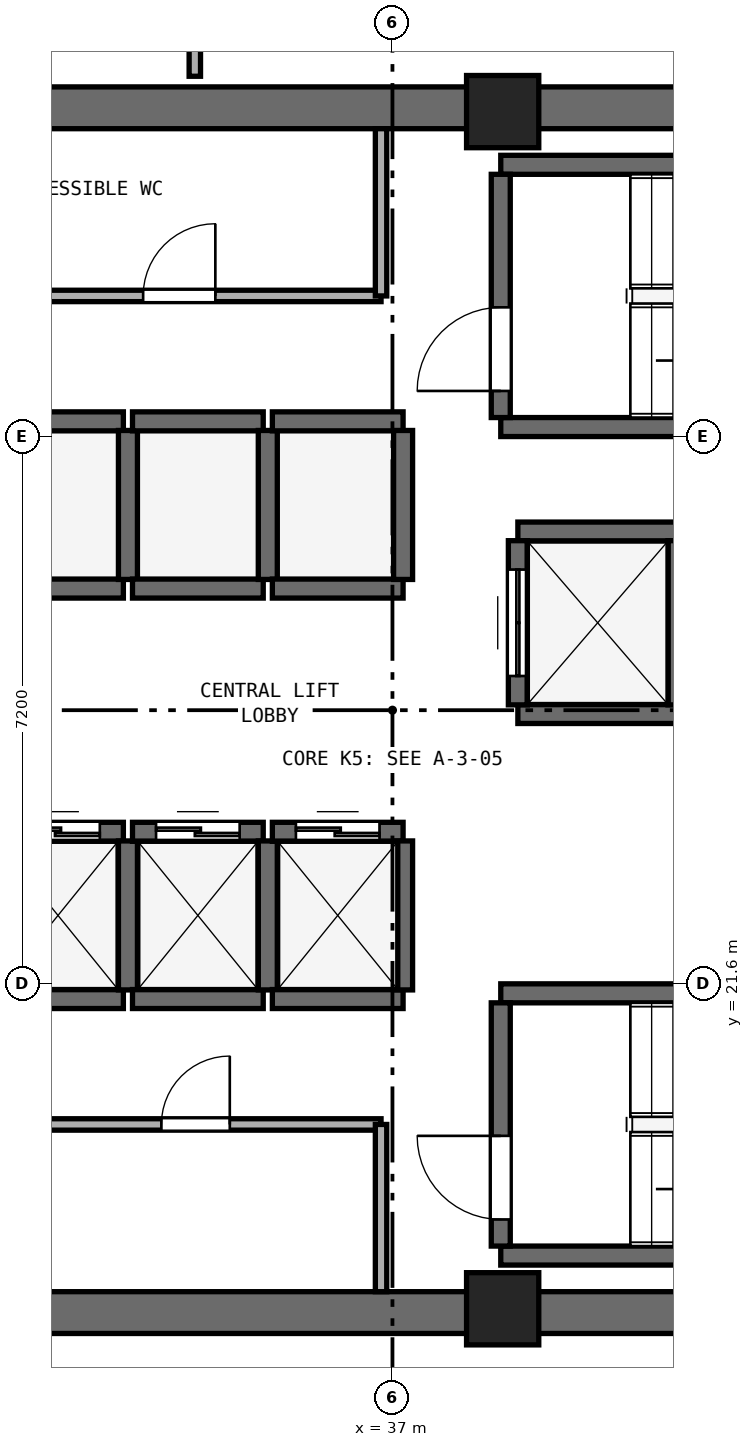
"""IFC4 building model, lengths in metres.
Left out: names, types, materials, properties, quantities, classifications, styles, units other than length and angle.
Written with IfcOpenShell. Run it as: python <this file> out.ifc"""

import sys

from ifc_helpers import new_model, si_unit, direction, frame, frame_2d, origin, origin_2d, place, context, subcontext, project, spatial, rectangle, extrude, element, fill, save


model = new_model("IFC4")
c1 = context("Model", 3, precision=1e-05, world=origin(), true_north=direction((0.0, 1.0)))
c2 = subcontext(c1, "Body", "Model", "MODEL_VIEW")
j1 = project(units=[si_unit("LENGTHUNIT", "METRE"), si_unit("PLANEANGLEUNIT", "RADIAN")], contexts=[c1])
p1 = place(None, origin())
s1 = spatial("IfcSite", under=j1, at=p1, CompositionType="ELEMENT")
p2 = place(p1, origin())
s2 = spatial("IfcBuilding", under=s1, at=p2, CompositionType="ELEMENT")
p3 = place(p2, frame((0.0, 0.0, 136.4)))
s3 = spatial("IfcBuildingStorey", under=s2, at=p3, CompositionType="ELEMENT", Elevation=136.4)
for number, where, z_axis, x_axis in (
    (1, (25.4, 17.275, 0.0), (0.0, 0.0, 1.0), (1.0, 0.0, 0.0)),
    (2, (25.4, 33.125, 0.0), (0.0, 0.0, 1.0), (1.0, 0.0, 0.0)),
):
    element("IfcWall", number, at=place(p3, frame(where, z_axis=z_axis, x_axis=x_axis)), inside=s3, PredefinedType="SHEAR", context=c2, shape_type="SweptSolid", body=[
        extrude(rectangle(XDim=23.2, YDim=0.55, at=frame_2d((11.6, 0.0))), origin(), (0.0, 0.0, 1.0), 3.54),
    ])
for number, where, z_axis, x_axis in (
    (3, (38.45, 17.325, 0.0), (0.0, 0.0, 1.0), (1.0, 0.0, 0.0)),
    (4, (38.45, 33.075, 0.0), (0.0, 0.0, 1.0), (1.0, 0.0, 0.0)),
):
    element("IfcColumn", number, at=place(p3, frame(where, z_axis=z_axis, x_axis=x_axis)), inside=s3, PredefinedType="PILASTER", context=c2, shape_type="SweptSolid", body=[
        extrude(rectangle(XDim=0.95, YDim=0.95, at=origin_2d()), origin(), (0.0, 0.0, 1.0), 3.8),
    ])
for number, where, z_axis, x_axis in (
    (5, (38.425, 28.925, 0.0), (0.0, 0.0, 1.0), (1.0, 0.0, 0.0)),
    (6, (38.425, 32.375, 0.0), (0.0, 0.0, 1.0), (1.0, 0.0, 0.0)),
):
    element("IfcWall", number, at=place(p3, frame(where, z_axis=z_axis, x_axis=x_axis)), inside=s3, PredefinedType="SHEAR", context=c2, shape_type="SweptSolid", body=[
        extrude(rectangle(XDim=7.3, YDim=0.25, at=frame_2d((3.65, 0.0))), origin(), (0.0, 0.0, 1.0), 3.54),
    ])
p4 = place(p3, frame((38.425, 29.05, 0.0), z_axis=(0.0, 0.0, 1.0), x_axis=(0.0, 1.0, 0.0)))
e7 = element("IfcWall", 7, at=p4, inside=s3, PredefinedType="SHEAR", context=c2, shape_type="SweptSolid", body=[
    extrude(rectangle(XDim=3.2, YDim=0.25, at=frame_2d((1.6, 0.0))), origin(), (0.0, 0.0, 1.0), 3.54),
])
p5 = place(p4, frame((0.35, 0.0, 0.0)))
e8 = element("IfcOpeningElement", 8, at=p5, cuts=e7, PredefinedType="OPENING", context=c2, shape_type="SweptSolid", body=[
    extrude(rectangle(XDim=1.1, YDim=2.15, at=frame_2d((0.55, 1.075))), frame((0.0, 0.135, 0.0), z_axis=(0.0, -1.0, 0.0), x_axis=(1.0, 0.0, 0.0)), (0.0, 0.0, 1.0), 0.27),
])
for number, where, z_axis, x_axis in (
    (9, (38.425, 18.025, 0.0), (0.0, 0.0, 1.0), (1.0, 0.0, 0.0)),
    (10, (38.425, 21.475, 0.0), (0.0, 0.0, 1.0), (1.0, 0.0, 0.0)),
):
    element("IfcWall", number, at=place(p3, frame(where, z_axis=z_axis, x_axis=x_axis)), inside=s3, PredefinedType="SHEAR", context=c2, shape_type="SweptSolid", body=[
        extrude(rectangle(XDim=7.3, YDim=0.25, at=frame_2d((3.65, 0.0))), origin(), (0.0, 0.0, 1.0), 3.54),
    ])
p6 = place(p3, frame((38.425, 18.15, 0.0), z_axis=(0.0, 0.0, 1.0), x_axis=(0.0, 1.0, 0.0)))
e11 = element("IfcWall", 11, at=p6, inside=s3, PredefinedType="SHEAR", context=c2, shape_type="SweptSolid", body=[
    extrude(rectangle(XDim=3.2, YDim=0.25, at=frame_2d((1.6, 0.0))), origin(), (0.0, 0.0, 1.0), 3.54),
])
p7 = place(p6, frame((0.35, 0.0, 0.0)))
e12 = element("IfcOpeningElement", 12, at=p7, cuts=e11, PredefinedType="OPENING", context=c2, shape_type="SweptSolid", body=[
    extrude(rectangle(XDim=1.1, YDim=2.15, at=frame_2d((0.55, 1.075))), frame((0.0, 0.135, 0.0), z_axis=(0.0, -1.0, 0.0), x_axis=(1.0, 0.0, 0.0)), (0.0, 0.0, 1.0), 0.27),
])
p8 = place(p3, frame((31.74, 21.4, 0.0), z_axis=(0.0, 0.0, 1.0), x_axis=(1.0, 0.0, 0.0)))
e13 = element("IfcWall", 13, at=p8, inside=s3, PredefinedType="SHEAR", context=c2, shape_type="SweptSolid", body=[
    extrude(rectangle(XDim=1.72, YDim=0.25, at=frame_2d((0.86, 0.0))), origin(), (0.0, 0.0, 1.0), 3.54),
])
p9 = place(p3, frame((31.74, 23.6, 0.0), z_axis=(0.0, 0.0, 1.0), x_axis=(1.0, 0.0, 0.0)))
e14 = element("IfcWall", 14, at=p9, inside=s3, PredefinedType="SHEAR", context=c2, shape_type="SweptSolid", body=[
    extrude(rectangle(XDim=1.72, YDim=0.25, at=frame_2d((0.86, 0.0))), origin(), (0.0, 0.0, 1.0), 3.54),
])
p10 = place(p9, frame((0.31, 0.0, 0.0)))
e15 = element("IfcOpeningElement", 15, at=p10, cuts=e14, PredefinedType="OPENING", context=c2, shape_type="SweptSolid", body=[
    extrude(rectangle(XDim=1.1, YDim=2.15, at=frame_2d((0.55, 1.075))), frame((0.0, 0.135, 0.0), z_axis=(0.0, -1.0, 0.0), x_axis=(1.0, 0.0, 0.0)), (0.0, 0.0, 1.0), 0.27),
])
p11 = place(p3, frame((33.52, 21.52, 0.0), z_axis=(0.0, 0.0, 1.0), x_axis=(0.0, 1.0, 0.0)))
e16 = element("IfcWall", 16, at=p11, inside=s3, PredefinedType="SHEAR", context=c2, shape_type="SweptSolid", body=[
    extrude(rectangle(XDim=1.96, YDim=0.25, at=frame_2d((0.98, 0.0))), origin(), (0.0, 0.0, 1.0), 3.54),
])
p12 = place(p3, frame((33.58, 21.4, 0.0), z_axis=(0.0, 0.0, 1.0), x_axis=(1.0, 0.0, 0.0)))
e17 = element("IfcWall", 17, at=p12, inside=s3, PredefinedType="SHEAR", context=c2, shape_type="SweptSolid", body=[
    extrude(rectangle(XDim=1.72, YDim=0.25, at=frame_2d((0.86, 0.0))), origin(), (0.0, 0.0, 1.0), 3.54),
])
p13 = place(p3, frame((33.58, 23.6, 0.0), z_axis=(0.0, 0.0, 1.0), x_axis=(1.0, 0.0, 0.0)))
e18 = element("IfcWall", 18, at=p13, inside=s3, PredefinedType="SHEAR", context=c2, shape_type="SweptSolid", body=[
    extrude(rectangle(XDim=1.72, YDim=0.25, at=frame_2d((0.86, 0.0))), origin(), (0.0, 0.0, 1.0), 3.54),
])
p14 = place(p13, frame((0.31, 0.0, 0.0)))
e19 = element("IfcOpeningElement", 19, at=p14, cuts=e18, PredefinedType="OPENING", context=c2, shape_type="SweptSolid", body=[
    extrude(rectangle(XDim=1.1, YDim=2.15, at=frame_2d((0.55, 1.075))), frame((0.0, 0.135, 0.0), z_axis=(0.0, -1.0, 0.0), x_axis=(1.0, 0.0, 0.0)), (0.0, 0.0, 1.0), 0.27),
])
p15 = place(p3, frame((35.36, 21.52, 0.0), z_axis=(0.0, 0.0, 1.0), x_axis=(0.0, 1.0, 0.0)))
e20 = element("IfcWall", 20, at=p15, inside=s3, PredefinedType="SHEAR", context=c2, shape_type="SweptSolid", body=[
    extrude(rectangle(XDim=1.96, YDim=0.25, at=frame_2d((0.98, 0.0))), origin(), (0.0, 0.0, 1.0), 3.54),
])
p16 = place(p3, frame((35.42, 21.4, 0.0), z_axis=(0.0, 0.0, 1.0), x_axis=(1.0, 0.0, 0.0)))
e21 = element("IfcWall", 21, at=p16, inside=s3, PredefinedType="SHEAR", context=c2, shape_type="SweptSolid", body=[
    extrude(rectangle(XDim=1.72, YDim=0.25, at=frame_2d((0.86, 0.0))), origin(), (0.0, 0.0, 1.0), 3.54),
])
p17 = place(p3, frame((35.42, 23.6, 0.0), z_axis=(0.0, 0.0, 1.0), x_axis=(1.0, 0.0, 0.0)))
e22 = element("IfcWall", 22, at=p17, inside=s3, PredefinedType="SHEAR", context=c2, shape_type="SweptSolid", body=[
    extrude(rectangle(XDim=1.72, YDim=0.25, at=frame_2d((0.86, 0.0))), origin(), (0.0, 0.0, 1.0), 3.54),
])
p18 = place(p17, frame((0.31, 0.0, 0.0)))
e23 = element("IfcOpeningElement", 23, at=p18, cuts=e22, PredefinedType="OPENING", context=c2, shape_type="SweptSolid", body=[
    extrude(rectangle(XDim=1.1, YDim=2.15, at=frame_2d((0.55, 1.075))), frame((0.0, 0.135, 0.0), z_axis=(0.0, -1.0, 0.0), x_axis=(1.0, 0.0, 0.0)), (0.0, 0.0, 1.0), 0.27),
])
p19 = place(p3, frame((37.14, 21.52, 0.0), z_axis=(0.0, 0.0, 1.0), x_axis=(0.0, 1.0, 0.0)))
e24 = element("IfcWall", 24, at=p19, inside=s3, PredefinedType="SHEAR", context=c2, shape_type="SweptSolid", body=[
    extrude(rectangle(XDim=1.96, YDim=0.25, at=frame_2d((0.98, 0.0))), origin(), (0.0, 0.0, 1.0), 3.54),
])
for number, where, z_axis, x_axis in (
    (25, (31.74, 26.8, 0.0), (0.0, 0.0, 1.0), (1.0, 0.0, 0.0)),
    (26, (31.74, 29.0, 0.0), (0.0, 0.0, 1.0), (1.0, 0.0, 0.0)),
):
    element("IfcWall", number, at=place(p3, frame(where, z_axis=z_axis, x_axis=x_axis)), inside=s3, PredefinedType="SHEAR", context=c2, shape_type="SweptSolid", body=[
        extrude(rectangle(XDim=1.72, YDim=0.25, at=frame_2d((0.86, 0.0))), origin(), (0.0, 0.0, 1.0), 3.54),
    ])
p20 = place(p3, frame((33.52, 26.92, 0.0), z_axis=(0.0, 0.0, 1.0), x_axis=(0.0, 1.0, 0.0)))
e27 = element("IfcWall", 27, at=p20, inside=s3, PredefinedType="SHEAR", context=c2, shape_type="SweptSolid", body=[
    extrude(rectangle(XDim=1.96, YDim=0.25, at=frame_2d((0.98, 0.0))), origin(), (0.0, 0.0, 1.0), 3.54),
])
for number, where, z_axis, x_axis in (
    (28, (33.58, 26.8, 0.0), (0.0, 0.0, 1.0), (1.0, 0.0, 0.0)),
    (29, (33.58, 29.0, 0.0), (0.0, 0.0, 1.0), (1.0, 0.0, 0.0)),
):
    element("IfcWall", number, at=place(p3, frame(where, z_axis=z_axis, x_axis=x_axis)), inside=s3, PredefinedType="SHEAR", context=c2, shape_type="SweptSolid", body=[
        extrude(rectangle(XDim=1.72, YDim=0.25, at=frame_2d((0.86, 0.0))), origin(), (0.0, 0.0, 1.0), 3.54),
    ])
p21 = place(p3, frame((35.36, 26.92, 0.0), z_axis=(0.0, 0.0, 1.0), x_axis=(0.0, 1.0, 0.0)))
e30 = element("IfcWall", 30, at=p21, inside=s3, PredefinedType="SHEAR", context=c2, shape_type="SweptSolid", body=[
    extrude(rectangle(XDim=1.96, YDim=0.25, at=frame_2d((0.98, 0.0))), origin(), (0.0, 0.0, 1.0), 3.54),
])
for number, where, z_axis, x_axis in (
    (31, (35.42, 26.8, 0.0), (0.0, 0.0, 1.0), (1.0, 0.0, 0.0)),
    (32, (35.42, 29.0, 0.0), (0.0, 0.0, 1.0), (1.0, 0.0, 0.0)),
):
    element("IfcWall", number, at=place(p3, frame(where, z_axis=z_axis, x_axis=x_axis)), inside=s3, PredefinedType="SHEAR", context=c2, shape_type="SweptSolid", body=[
        extrude(rectangle(XDim=1.72, YDim=0.25, at=frame_2d((0.86, 0.0))), origin(), (0.0, 0.0, 1.0), 3.54),
    ])
p22 = place(p3, frame((37.14, 26.92, 0.0), z_axis=(0.0, 0.0, 1.0), x_axis=(0.0, 1.0, 0.0)))
e33 = element("IfcWall", 33, at=p22, inside=s3, PredefinedType="SHEAR", context=c2, shape_type="SweptSolid", body=[
    extrude(rectangle(XDim=1.96, YDim=0.25, at=frame_2d((0.98, 0.0))), origin(), (0.0, 0.0, 1.0), 3.54),
])
for number, where, z_axis, x_axis in (
    (34, (38.65, 25.15, 0.0), (0.0, 0.0, 1.0), (1.0, 0.0, 0.0)),
    (35, (38.65, 27.55, 0.0), (0.0, 0.0, 1.0), (1.0, 0.0, 0.0)),
):
    element("IfcWall", number, at=place(p3, frame(where, z_axis=z_axis, x_axis=x_axis)), inside=s3, PredefinedType="SHEAR", context=c2, shape_type="SweptSolid", body=[
        extrude(rectangle(XDim=2.1, YDim=0.25, at=frame_2d((1.05, 0.0))), origin(), (0.0, 0.0, 1.0), 3.54),
    ])
p23 = place(p3, frame((38.65, 25.27, 0.0), z_axis=(0.0, 0.0, 1.0), x_axis=(0.0, 1.0, 0.0)))
e36 = element("IfcWall", 36, at=p23, inside=s3, PredefinedType="SHEAR", context=c2, shape_type="SweptSolid", body=[
    extrude(rectangle(XDim=2.16, YDim=0.25, at=frame_2d((1.08, 0.0))), origin(), (0.0, 0.0, 1.0), 3.54),
])
p24 = place(p23, frame((0.38, 0.0, 0.0)))
e37 = element("IfcOpeningElement", 37, at=p24, cuts=e36, PredefinedType="OPENING", context=c2, shape_type="SweptSolid", body=[
    extrude(rectangle(XDim=1.4, YDim=2.2, at=frame_2d((0.7, 1.1))), frame((0.0, 0.135, 0.0), z_axis=(0.0, -1.0, 0.0), x_axis=(1.0, 0.0, 0.0)), (0.0, 0.0, 1.0), 0.27),
])
p25 = place(p3, frame((40.75, 25.27, 0.0), z_axis=(0.0, 0.0, 1.0), x_axis=(0.0, 1.0, 0.0)))
e38 = element("IfcWall", 38, at=p25, inside=s3, PredefinedType="SHEAR", context=c2, shape_type="SweptSolid", body=[
    extrude(rectangle(XDim=2.16, YDim=0.25, at=frame_2d((1.08, 0.0))), origin(), (0.0, 0.0, 1.0), 3.54),
])
p26 = place(p3, frame((31.54, 30.65, 0.0), z_axis=(0.0, 0.0, 1.0), x_axis=(1.0, 0.0, 0.0)))
e39 = element("IfcWall", 39, at=p26, inside=s3, PredefinedType="PARTITIONING", context=c2, shape_type="SweptSolid", body=[
    extrude(rectangle(XDim=5.31, YDim=0.15, at=frame_2d((2.655, 0.0))), origin(), (0.0, 0.0, 1.0), 3.54),
])
p27 = place(p26, frame((2.18, 0.0, 0.0)))
e40 = element("IfcOpeningElement", 40, at=p27, cuts=e39, PredefinedType="OPENING", context=c2, shape_type="SweptSolid", body=[
    extrude(rectangle(XDim=0.95, YDim=2.1, at=frame_2d((0.475, 1.05))), frame((0.0, 0.085, 0.0), z_axis=(0.0, -1.0, 0.0), x_axis=(1.0, 0.0, 0.0)), (0.0, 0.0, 1.0), 0.17),
])
p28 = place(p3, frame((36.85, 30.65, 0.0), z_axis=(0.0, 0.0, 1.0), x_axis=(0.0, 1.0, 0.0)))
e41 = element("IfcWall", 41, at=p28, inside=s3, PredefinedType="PARTITIONING", context=c2, shape_type="SweptSolid", body=[
    extrude(rectangle(XDim=2.2, YDim=0.15, at=frame_2d((1.1, 0.0))), origin(), (0.0, 0.0, 1.0), 3.54),
])
p29 = place(p3, frame((31.97, 19.75, 0.0), z_axis=(0.0, 0.0, 1.0), x_axis=(1.0, 0.0, 0.0)))
e42 = element("IfcWall", 42, at=p29, inside=s3, PredefinedType="PARTITIONING", context=c2, shape_type="SweptSolid", body=[
    extrude(rectangle(XDim=4.88, YDim=0.15, at=frame_2d((2.44, 0.0))), origin(), (0.0, 0.0, 1.0), 3.54),
])
p30 = place(p29, frame((1.99, 0.0, 0.0)))
e43 = element("IfcOpeningElement", 43, at=p30, cuts=e42, PredefinedType="OPENING", context=c2, shape_type="SweptSolid", body=[
    extrude(rectangle(XDim=0.9, YDim=2.1, at=frame_2d((0.45, 1.05))), frame((0.0, 0.085, 0.0), z_axis=(0.0, -1.0, 0.0), x_axis=(1.0, 0.0, 0.0)), (0.0, 0.0, 1.0), 0.17),
])
p31 = place(p3, frame((36.85, 17.55, 0.0), z_axis=(0.0, 0.0, 1.0), x_axis=(0.0, 1.0, 0.0)))
e44 = element("IfcWall", 44, at=p31, inside=s3, PredefinedType="PARTITIONING", context=c2, shape_type="SweptSolid", body=[
    extrude(rectangle(XDim=2.2, YDim=0.15, at=frame_2d((1.1, 0.0))), origin(), (0.0, 0.0, 1.0), 3.54),
])
p32 = place(p3, frame((34.4, 33.54, 0.0), z_axis=(0.0, 0.0, 1.0), x_axis=(0.0, 1.0, 0.0)))
e45 = element("IfcWall", 45, at=p32, inside=s3, PredefinedType="PARTITIONING", context=c2, shape_type="SweptSolid", body=[
    extrude(rectangle(XDim=3.71, YDim=0.15, at=frame_2d((1.855, 0.0))), origin(), (0.0, 0.0, 1.0), 3.54),
])
p33 = place(p32, frame((1.355, 0.0, 0.0)))
e46 = element("IfcOpeningElement", 46, at=p33, cuts=e45, PredefinedType="OPENING", context=c2, shape_type="SweptSolid", body=[
    extrude(rectangle(XDim=1.0, YDim=2.12, at=frame_2d((0.5, 1.06))), frame((0.0, 0.085, 0.0), z_axis=(0.0, -1.0, 0.0), x_axis=(1.0, 0.0, 0.0)), (0.0, 0.0, 1.0), 0.17),
])
p34 = place(p5, origin())
e47 = element("IfcDoor", 47, at=p34, inside=s3, OperationType="SINGLE_SWING_LEFT", PredefinedType="DOOR", context=c2, shape_type="SweptSolid", body=[
    extrude(rectangle(XDim=1.1, YDim=2.15, at=frame_2d((0.55, 1.075))), frame((0.0, 0.025, 0.0), z_axis=(0.0, -1.0, 0.0), x_axis=(1.0, 0.0, 0.0)), (0.0, 0.0, 1.0), 0.05),
])
fill(e8, e47)
p35 = place(p7, origin())
e48 = element("IfcDoor", 48, at=p35, inside=s3, OperationType="SINGLE_SWING_RIGHT", PredefinedType="DOOR", context=c2, shape_type="SweptSolid", body=[
    extrude(rectangle(XDim=1.1, YDim=2.15, at=frame_2d((0.55, 1.075))), frame((0.0, 0.025, 0.0), z_axis=(0.0, -1.0, 0.0), x_axis=(1.0, 0.0, 0.0)), (0.0, 0.0, 1.0), 0.05),
])
fill(e12, e48)
p36 = place(p10, origin())
e49 = element("IfcDoor", 49, at=p36, inside=s3, OperationType="DOUBLE_DOOR_SLIDING", PredefinedType="DOOR", context=c2, shape_type="SweptSolid", body=[
    extrude(rectangle(XDim=1.1, YDim=2.15, at=frame_2d((0.55, 1.075))), frame((0.0, 0.025, 0.0), z_axis=(0.0, -1.0, 0.0), x_axis=(1.0, 0.0, 0.0)), (0.0, 0.0, 1.0), 0.05),
])
fill(e15, e49)
p37 = place(p14, origin())
e50 = element("IfcDoor", 50, at=p37, inside=s3, OperationType="DOUBLE_DOOR_SLIDING", PredefinedType="DOOR", context=c2, shape_type="SweptSolid", body=[
    extrude(rectangle(XDim=1.1, YDim=2.15, at=frame_2d((0.55, 1.075))), frame((0.0, 0.025, 0.0), z_axis=(0.0, -1.0, 0.0), x_axis=(1.0, 0.0, 0.0)), (0.0, 0.0, 1.0), 0.05),
])
fill(e19, e50)
p38 = place(p18, origin())
e51 = element("IfcDoor", 51, at=p38, inside=s3, OperationType="DOUBLE_DOOR_SLIDING", PredefinedType="DOOR", context=c2, shape_type="SweptSolid", body=[
    extrude(rectangle(XDim=1.1, YDim=2.15, at=frame_2d((0.55, 1.075))), frame((0.0, 0.025, 0.0), z_axis=(0.0, -1.0, 0.0), x_axis=(1.0, 0.0, 0.0)), (0.0, 0.0, 1.0), 0.05),
])
fill(e23, e51)
p39 = place(p24, origin())
e52 = element("IfcDoor", 52, at=p39, inside=s3, OperationType="DOUBLE_DOOR_SLIDING", PredefinedType="DOOR", context=c2, shape_type="SweptSolid", body=[
    extrude(rectangle(XDim=1.4, YDim=2.2, at=frame_2d((0.7, 1.1))), frame((0.0, 0.025, 0.0), z_axis=(0.0, -1.0, 0.0), x_axis=(1.0, 0.0, 0.0)), (0.0, 0.0, 1.0), 0.05),
])
fill(e37, e52)
p40 = place(p27, origin())
e53 = element("IfcDoor", 53, at=p40, inside=s3, OperationType="SINGLE_SWING_RIGHT", PredefinedType="DOOR", context=c2, shape_type="SweptSolid", body=[
    extrude(rectangle(XDim=0.95, YDim=2.1, at=frame_2d((0.475, 1.05))), frame((0.0, 0.025, 0.0), z_axis=(0.0, -1.0, 0.0), x_axis=(1.0, 0.0, 0.0)), (0.0, 0.0, 1.0), 0.05),
])
fill(e40, e53)
p41 = place(p30, origin())
e54 = element("IfcDoor", 54, at=p41, inside=s3, OperationType="SINGLE_SWING_RIGHT", PredefinedType="DOOR", context=c2, shape_type="SweptSolid", body=[
    extrude(rectangle(XDim=0.9, YDim=2.1, at=frame_2d((0.45, 1.05))), frame((0.0, 0.025, 0.0), z_axis=(0.0, -1.0, 0.0), x_axis=(1.0, 0.0, 0.0)), (0.0, 0.0, 1.0), 0.05),
])
fill(e43, e54)
save(model, sys.argv[1])
